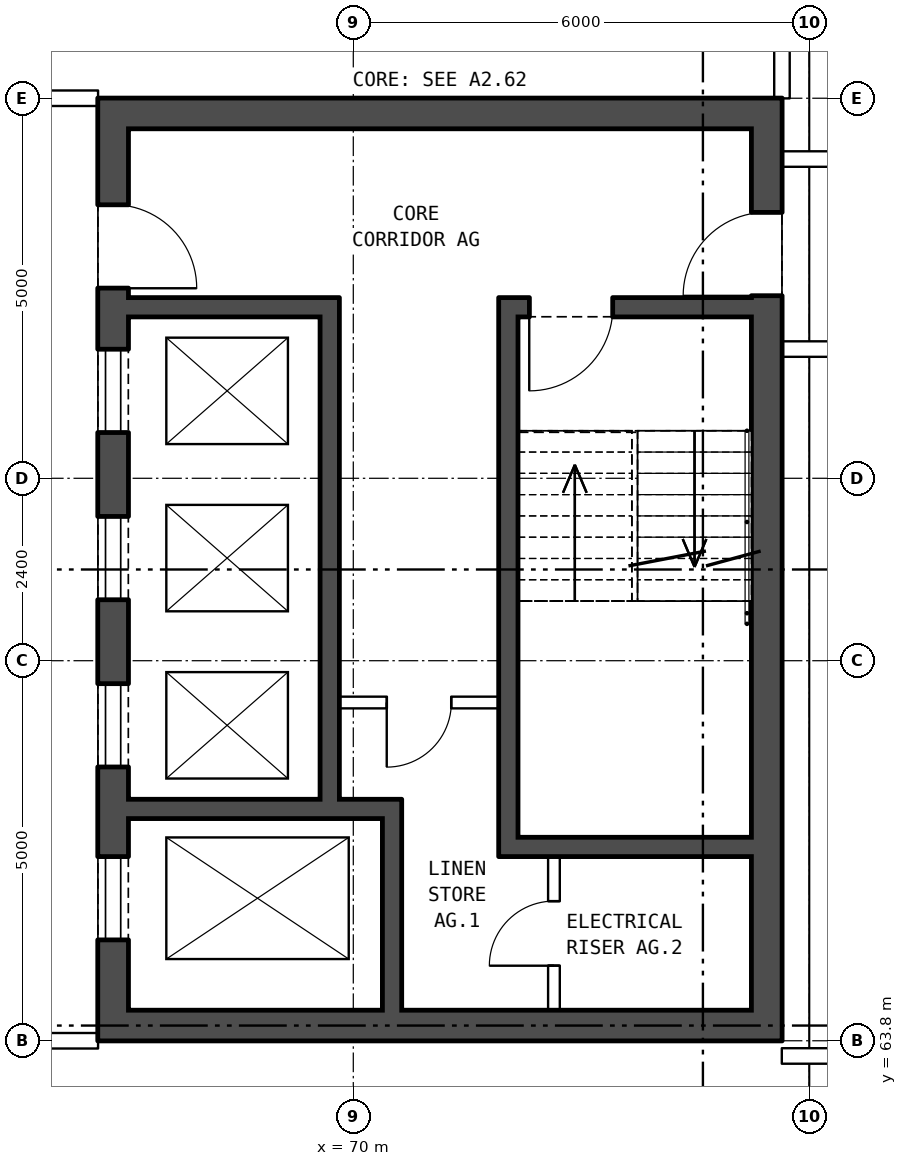
"""IFC4 building model, lengths in metres.
Left out: names, types, materials, properties, quantities, classifications, styles, units other than length and angle.
Written with IfcOpenShell. Run it as: python <this file> out.ifc"""

import sys

from ifc_helpers import new_model, si_unit, direction, frame, frame_2d, origin, place, context, subcontext, project, spatial, rectangle, extrude, element, fill, save


model = new_model("IFC4")
c1 = context("Model", 3, precision=1e-05, world=origin(), true_north=direction((0.0, 1.0)))
c2 = subcontext(c1, "Body", "Model", "MODEL_VIEW")
j1 = project(units=[si_unit("LENGTHUNIT", "METRE"), si_unit("PLANEANGLEUNIT", "RADIAN")], contexts=[c1])
p1 = place(None, origin())
s1 = spatial("IfcSite", under=j1, at=p1, CompositionType="ELEMENT")
p2 = place(p1, origin())
s2 = spatial("IfcBuilding", under=s1, at=p2, CompositionType="ELEMENT")
p3 = place(p2, frame((0.0, 0.0, 215.2)))
s3 = spatial("IfcBuildingStorey", under=s2, at=p3, CompositionType="ELEMENT", Elevation=215.2)
p4 = place(p3, frame((66.84, 63.8, 0.0), z_axis=(0.0, 0.0, 1.0), x_axis=(0.0, 1.0, 0.0)))
e1 = element("IfcWall", 1, at=p4, inside=s3, PredefinedType="SHEAR", context=c2, shape_type="SweptSolid", body=[
    extrude(rectangle(XDim=12.4, YDim=0.4, at=frame_2d((6.2, 0.0))), origin(), (0.0, 0.0, 1.0), 5.6),
])
p5 = place(p4, frame((1.325, 0.0, 0.0)))
e2 = element("IfcOpeningElement", 2, at=p5, cuts=e1, PredefinedType="OPENING", context=c2, shape_type="SweptSolid", body=[
    extrude(rectangle(XDim=1.1, YDim=2.1, at=frame_2d((0.55, 1.05))), frame((0.0, 0.21, 0.0), z_axis=(0.0, -1.0, 0.0), x_axis=(1.0, 0.0, 0.0)), (0.0, 0.0, 1.0), 0.42),
])
p6 = place(p4, frame((3.6, 0.0, 0.0)))
e3 = element("IfcOpeningElement", 3, at=p6, cuts=e1, PredefinedType="OPENING", context=c2, shape_type="SweptSolid", body=[
    extrude(rectangle(XDim=1.1, YDim=2.1, at=frame_2d((0.55, 1.05))), frame((0.0, 0.21, 0.0), z_axis=(0.0, -1.0, 0.0), x_axis=(1.0, 0.0, 0.0)), (0.0, 0.0, 1.0), 0.42),
])
p7 = place(p4, frame((5.8, 0.0, 0.0)))
e4 = element("IfcOpeningElement", 4, at=p7, cuts=e1, PredefinedType="OPENING", context=c2, shape_type="SweptSolid", body=[
    extrude(rectangle(XDim=1.1, YDim=2.1, at=frame_2d((0.55, 1.05))), frame((0.0, 0.21, 0.0), z_axis=(0.0, -1.0, 0.0), x_axis=(1.0, 0.0, 0.0)), (0.0, 0.0, 1.0), 0.42),
])
p8 = place(p4, frame((8.0, 0.0, 0.0)))
e5 = element("IfcOpeningElement", 5, at=p8, cuts=e1, PredefinedType="OPENING", context=c2, shape_type="SweptSolid", body=[
    extrude(rectangle(XDim=1.1, YDim=2.1, at=frame_2d((0.55, 1.05))), frame((0.0, 0.21, 0.0), z_axis=(0.0, -1.0, 0.0), x_axis=(1.0, 0.0, 0.0)), (0.0, 0.0, 1.0), 0.42),
])
p9 = place(p4, frame((9.9, 0.0, 0.0)))
e6 = element("IfcOpeningElement", 6, at=p9, cuts=e1, PredefinedType="OPENING", context=c2, shape_type="SweptSolid", body=[
    extrude(rectangle(XDim=1.1, YDim=2.1, at=frame_2d((0.55, 1.05))), frame((0.0, 0.21, 0.0), z_axis=(0.0, -1.0, 0.0), x_axis=(1.0, 0.0, 0.0)), (0.0, 0.0, 1.0), 0.42),
])
p10 = place(p3, frame((75.44, 63.8, 0.0), z_axis=(0.0, 0.0, 1.0), x_axis=(0.0, 1.0, 0.0)))
e7 = element("IfcWall", 7, at=p10, inside=s3, PredefinedType="SHEAR", context=c2, shape_type="SweptSolid", body=[
    extrude(rectangle(XDim=12.4, YDim=0.4, at=frame_2d((6.2, 0.0))), origin(), (0.0, 0.0, 1.0), 5.6),
])
p11 = place(p10, frame((9.8, 0.0, 0.0)))
e8 = element("IfcOpeningElement", 8, at=p11, cuts=e7, PredefinedType="OPENING", context=c2, shape_type="SweptSolid", body=[
    extrude(rectangle(XDim=1.1, YDim=2.1, at=frame_2d((0.55, 1.05))), frame((0.0, 0.21, 0.0), z_axis=(0.0, -1.0, 0.0), x_axis=(1.0, 0.0, 0.0)), (0.0, 0.0, 1.0), 0.42),
])
for number, where, z_axis, x_axis in (
    (9, (67.04, 64.0, 0.0), (0.0, 0.0, 1.0), (1.0, 0.0, 0.0)),
    (10, (67.04, 76.0, 0.0), (0.0, 0.0, 1.0), (1.0, 0.0, 0.0)),
):
    element("IfcWall", number, at=place(p3, frame(where, z_axis=z_axis, x_axis=x_axis)), inside=s3, PredefinedType="SHEAR", context=c2, shape_type="SweptSolid", body=[
        extrude(rectangle(XDim=8.2, YDim=0.4, at=frame_2d((4.1, 0.0))), origin(), (0.0, 0.0, 1.0), 5.6),
    ])
p12 = place(p3, frame((72.165, 66.35, 0.0), z_axis=(0.0, 0.0, 1.0), x_axis=(1.0, 0.0, 0.0)))
e11 = element("IfcWall", 11, at=p12, inside=s3, PredefinedType="SHEAR", context=c2, shape_type="SweptSolid", body=[
    extrude(rectangle(XDim=3.075, YDim=0.25, at=frame_2d((1.538, 0.0))), origin(), (0.0, 0.0, 1.0), 5.6),
])
p13 = place(p3, frame((67.04, 66.85, 0.0), z_axis=(0.0, 0.0, 1.0), x_axis=(1.0, 0.0, 0.0)))
e12 = element("IfcWall", 12, at=p13, inside=s3, PredefinedType="SHEAR", context=c2, shape_type="SweptSolid", body=[
    extrude(rectangle(XDim=3.595, YDim=0.25, at=frame_2d((1.797, 0.0))), origin(), (0.0, 0.0, 1.0), 5.6),
])
p14 = place(p3, frame((69.815, 68.25, 0.0), z_axis=(0.0, 0.0, 1.0), x_axis=(1.0, 0.0, 0.0)))
e13 = element("IfcWall", 13, at=p14, inside=s3, PredefinedType="PARTITIONING", context=c2, shape_type="SweptSolid", body=[
    extrude(rectangle(XDim=2.1, YDim=0.15, at=frame_2d((1.05, 0.0))), origin(), (0.0, 0.0, 1.0), 5.6),
])
p15 = place(p14, frame((0.625, 0.0, 0.0)))
e14 = element("IfcOpeningElement", 14, at=p15, cuts=e13, PredefinedType="OPENING", context=c2, shape_type="SweptSolid", body=[
    extrude(rectangle(XDim=0.85, YDim=2.1, at=frame_2d((0.425, 1.05))), frame((0.0, 0.085, 0.0), z_axis=(0.0, -1.0, 0.0), x_axis=(1.0, 0.0, 0.0)), (0.0, 0.0, 1.0), 0.17),
])
p16 = place(p3, frame((67.04, 73.45, 0.0), z_axis=(0.0, 0.0, 1.0), x_axis=(1.0, 0.0, 0.0)))
e15 = element("IfcWall", 15, at=p16, inside=s3, PredefinedType="SHEAR", context=c2, shape_type="SweptSolid", body=[
    extrude(rectangle(XDim=2.525, YDim=0.25, at=frame_2d((1.262, 0.0))), origin(), (0.0, 0.0, 1.0), 5.6),
])
p17 = place(p3, frame((72.165, 73.45, 0.0), z_axis=(0.0, 0.0, 1.0), x_axis=(1.0, 0.0, 0.0)))
e16 = element("IfcWall", 16, at=p17, inside=s3, PredefinedType="SHEAR", context=c2, shape_type="SweptSolid", body=[
    extrude(rectangle(XDim=3.075, YDim=0.25, at=frame_2d((1.538, 0.0))), origin(), (0.0, 0.0, 1.0), 5.6),
])
p18 = place(p17, frame((0.15, 0.0, 0.0)))
e17 = element("IfcOpeningElement", 17, at=p18, cuts=e16, PredefinedType="OPENING", context=c2, shape_type="SweptSolid", body=[
    extrude(rectangle(XDim=1.1, YDim=2.1, at=frame_2d((0.55, 1.05))), frame((0.0, 0.135, 0.0), z_axis=(0.0, -1.0, 0.0), x_axis=(1.0, 0.0, 0.0)), (0.0, 0.0, 1.0), 0.27),
])
p19 = place(p3, frame((69.69, 66.975, 0.0), z_axis=(0.0, 0.0, 1.0), x_axis=(0.0, 1.0, 0.0)))
e18 = element("IfcWall", 18, at=p19, inside=s3, PredefinedType="SHEAR", context=c2, shape_type="SweptSolid", body=[
    extrude(rectangle(XDim=6.6, YDim=0.25, at=frame_2d((3.3, 0.0))), origin(), (0.0, 0.0, 1.0), 5.6),
])
p20 = place(p3, frame((70.51, 64.2, 0.0), z_axis=(0.0, 0.0, 1.0), x_axis=(0.0, 1.0, 0.0)))
e19 = element("IfcWall", 19, at=p20, inside=s3, PredefinedType="SHEAR", context=c2, shape_type="SweptSolid", body=[
    extrude(rectangle(XDim=2.525, YDim=0.25, at=frame_2d((1.263, 0.0))), origin(), (0.0, 0.0, 1.0), 5.6),
])
p21 = place(p3, frame((72.04, 66.225, 0.0), z_axis=(0.0, 0.0, 1.0), x_axis=(0.0, 1.0, 0.0)))
e20 = element("IfcWall", 20, at=p21, inside=s3, PredefinedType="SHEAR", context=c2, shape_type="SweptSolid", body=[
    extrude(rectangle(XDim=7.35, YDim=0.25, at=frame_2d((3.675, 0.0))), origin(), (0.0, 0.0, 1.0), 5.6),
])
p22 = place(p3, frame((72.64, 64.2, 0.0), z_axis=(0.0, 0.0, 1.0), x_axis=(0.0, 1.0, 0.0)))
e21 = element("IfcWall", 21, at=p22, inside=s3, PredefinedType="PARTITIONING", context=c2, shape_type="SweptSolid", body=[
    extrude(rectangle(XDim=2.025, YDim=0.15, at=frame_2d((1.013, 0.0))), origin(), (0.0, 0.0, 1.0), 5.6),
])
p23 = place(p22, frame((0.587, 0.0, 0.0)))
e22 = element("IfcOpeningElement", 22, at=p23, cuts=e21, PredefinedType="OPENING", context=c2, shape_type="SweptSolid", body=[
    extrude(rectangle(XDim=0.85, YDim=2.1, at=frame_2d((0.425, 1.05))), frame((0.0, 0.085, 0.0), z_axis=(0.0, -1.0, 0.0), x_axis=(1.0, 0.0, 0.0)), (0.0, 0.0, 1.0), 0.17),
])
p24 = place(p3, frame((75.64, 63.6, 0.0), z_axis=(0.0, 0.0, 1.0), x_axis=(1.0, 0.0, 0.0)))
e23 = element("IfcWall", 23, at=p24, inside=s3, PredefinedType="PARTITIONING", context=c2, shape_type="SweptSolid", body=[
    extrude(rectangle(XDim=23.36, YDim=0.2, at=frame_2d((11.68, 0.0))), origin(), (0.0, 0.0, 1.0), 5.6),
])
p25 = place(p24, frame((5.955, 0.0, 0.0)))
e24 = element("IfcOpeningElement", 24, at=p25, cuts=e23, PredefinedType="OPENING", context=c2, shape_type="SweptSolid", body=[
    extrude(rectangle(XDim=1.0, YDim=2.1, at=frame_2d((0.5, 1.05))), frame((0.0, 0.11, 0.0), z_axis=(0.0, -1.0, 0.0), x_axis=(1.0, 0.0, 0.0)), (0.0, 0.0, 1.0), 0.22),
])
p26 = place(p3, frame((63.64, 63.8, 0.0), z_axis=(0.0, 0.0, 1.0), x_axis=(1.0, 0.0, 0.0)))
e25 = element("IfcWall", 25, at=p26, inside=s3, PredefinedType="PARTITIONING", context=c2, shape_type="SweptSolid", body=[
    extrude(rectangle(XDim=3.0, YDim=0.2, at=frame_2d((1.5, 0.0))), origin(), (0.0, 0.0, 1.0), 5.6),
])
p27 = place(p26, frame((1.0, 0.0, 0.0)))
e26 = element("IfcOpeningElement", 26, at=p27, cuts=e25, PredefinedType="OPENING", context=c2, shape_type="SweptSolid", body=[
    extrude(rectangle(XDim=1.0, YDim=2.1, at=frame_2d((0.5, 1.05))), frame((0.0, 0.11, 0.0), z_axis=(0.0, -1.0, 0.0), x_axis=(1.0, 0.0, 0.0)), (0.0, 0.0, 1.0), 0.22),
])
p28 = place(p3, frame((75.64, 72.9, 0.0), z_axis=(0.0, 0.0, 1.0), x_axis=(1.0, 0.0, 0.0)))
e27 = element("IfcWall", 27, at=p28, inside=s3, PredefinedType="PARTITIONING", context=c2, shape_type="SweptSolid", body=[
    extrude(rectangle(XDim=23.36, YDim=0.2, at=frame_2d((11.68, 0.0))), origin(), (0.0, 0.0, 1.0), 5.6),
])
p29 = place(p3, frame((75.64, 75.4, 0.0), z_axis=(0.0, 0.0, 1.0), x_axis=(1.0, 0.0, 0.0)))
e28 = element("IfcWall", 28, at=p29, inside=s3, PredefinedType="PARTITIONING", context=c2, shape_type="SweptSolid", body=[
    extrude(rectangle(XDim=55.72, YDim=0.2, at=frame_2d((27.86, 0.0))), origin(), (0.0, 0.0, 1.0), 5.6),
])
p30 = place(p29, frame((5.955, 0.0, 0.0)))
e29 = element("IfcOpeningElement", 29, at=p30, cuts=e28, PredefinedType="OPENING", context=c2, shape_type="SweptSolid", body=[
    extrude(rectangle(XDim=1.0, YDim=2.1, at=frame_2d((0.5, 1.05))), frame((0.0, 0.11, 0.0), z_axis=(0.0, -1.0, 0.0), x_axis=(1.0, 0.0, 0.0)), (0.0, 0.0, 1.0), 0.22),
])
p31 = place(p29, frame((17.048, 0.0, 0.0)))
e30 = element("IfcOpeningElement", 30, at=p31, cuts=e28, PredefinedType="OPENING", context=c2, shape_type="SweptSolid", body=[
    extrude(rectangle(XDim=1.0, YDim=2.1, at=frame_2d((0.5, 1.05))), frame((0.0, 0.11, 0.0), z_axis=(0.0, -1.0, 0.0), x_axis=(1.0, 0.0, 0.0)), (0.0, 0.0, 1.0), 0.22),
])
p32 = place(p29, frame((28.16, 0.0, 0.0)))
e31 = element("IfcOpeningElement", 31, at=p32, cuts=e28, PredefinedType="OPENING", context=c2, shape_type="SweptSolid", body=[
    extrude(rectangle(XDim=1.0, YDim=2.1, at=frame_2d((0.5, 1.05))), frame((0.0, 0.11, 0.0), z_axis=(0.0, -1.0, 0.0), x_axis=(1.0, 0.0, 0.0)), (0.0, 0.0, 1.0), 0.22),
])
p33 = place(p29, frame((37.672, 0.0, 0.0)))
e32 = element("IfcOpeningElement", 32, at=p33, cuts=e28, PredefinedType="OPENING", context=c2, shape_type="SweptSolid", body=[
    extrude(rectangle(XDim=1.0, YDim=2.1, at=frame_2d((0.5, 1.05))), frame((0.0, 0.11, 0.0), z_axis=(0.0, -1.0, 0.0), x_axis=(1.0, 0.0, 0.0)), (0.0, 0.0, 1.0), 0.22),
])
p34 = place(p29, frame((48.765, 0.0, 0.0)))
e33 = element("IfcOpeningElement", 33, at=p34, cuts=e28, PredefinedType="OPENING", context=c2, shape_type="SweptSolid", body=[
    extrude(rectangle(XDim=1.0, YDim=2.1, at=frame_2d((0.5, 1.05))), frame((0.0, 0.11, 0.0), z_axis=(0.0, -1.0, 0.0), x_axis=(1.0, 0.0, 0.0)), (0.0, 0.0, 1.0), 0.22),
])
p35 = place(p3, frame((63.64, 76.2, 0.0), z_axis=(0.0, 0.0, 1.0), x_axis=(1.0, 0.0, 0.0)))
e34 = element("IfcWall", 34, at=p35, inside=s3, PredefinedType="PARTITIONING", context=c2, shape_type="SweptSolid", body=[
    extrude(rectangle(XDim=3.0, YDim=0.2, at=frame_2d((1.5, 0.0))), origin(), (0.0, 0.0, 1.0), 5.6),
])
p36 = place(p35, frame((1.0, 0.0, 0.0)))
e35 = element("IfcOpeningElement", 35, at=p36, cuts=e34, PredefinedType="OPENING", context=c2, shape_type="SweptSolid", body=[
    extrude(rectangle(XDim=1.0, YDim=2.1, at=frame_2d((0.5, 1.05))), frame((0.0, 0.11, 0.0), z_axis=(0.0, -1.0, 0.0), x_axis=(1.0, 0.0, 0.0)), (0.0, 0.0, 1.0), 0.22),
])
p37 = place(p3, frame((75.64, 76.2, 0.0), z_axis=(0.0, 0.0, 1.0), x_axis=(0.0, 1.0, 0.0)))
e36 = element("IfcWall", 36, at=p37, inside=s3, PredefinedType="PARTITIONING", context=c2, shape_type="SweptSolid", body=[
    extrude(rectangle(XDim=3.1, YDim=0.2, at=frame_2d((1.55, 0.0))), origin(), (0.0, 0.0, 1.0), 5.6),
])
p38 = place(p5, origin())
e37 = element("IfcDoor", 37, at=p38, inside=s3, OperationType="DOUBLE_DOOR_SLIDING", PredefinedType="DOOR", context=c2, shape_type="SweptSolid", body=[
    extrude(rectangle(XDim=1.1, YDim=2.1, at=frame_2d((0.55, 1.05))), frame((0.0, -0.135, 0.0), z_axis=(0.0, -1.0, 0.0), x_axis=(1.0, 0.0, 0.0)), (0.0, 0.0, 1.0), 0.05),
])
fill(e2, e37)
p39 = place(p6, origin())
e38 = element("IfcDoor", 38, at=p39, inside=s3, OperationType="DOUBLE_DOOR_SLIDING", PredefinedType="DOOR", context=c2, shape_type="SweptSolid", body=[
    extrude(rectangle(XDim=1.1, YDim=2.1, at=frame_2d((0.55, 1.05))), frame((0.0, -0.135, 0.0), z_axis=(0.0, -1.0, 0.0), x_axis=(1.0, 0.0, 0.0)), (0.0, 0.0, 1.0), 0.05),
])
fill(e3, e38)
p40 = place(p7, origin())
e39 = element("IfcDoor", 39, at=p40, inside=s3, OperationType="DOUBLE_DOOR_SLIDING", PredefinedType="DOOR", context=c2, shape_type="SweptSolid", body=[
    extrude(rectangle(XDim=1.1, YDim=2.1, at=frame_2d((0.55, 1.05))), frame((0.0, -0.135, 0.0), z_axis=(0.0, -1.0, 0.0), x_axis=(1.0, 0.0, 0.0)), (0.0, 0.0, 1.0), 0.05),
])
fill(e4, e39)
p41 = place(p8, origin())
e40 = element("IfcDoor", 40, at=p41, inside=s3, OperationType="DOUBLE_DOOR_SLIDING", PredefinedType="DOOR", context=c2, shape_type="SweptSolid", body=[
    extrude(rectangle(XDim=1.1, YDim=2.1, at=frame_2d((0.55, 1.05))), frame((0.0, -0.135, 0.0), z_axis=(0.0, -1.0, 0.0), x_axis=(1.0, 0.0, 0.0)), (0.0, 0.0, 1.0), 0.05),
])
fill(e5, e40)
p42 = place(p9, frame((1.1, 0.0, 0.0), z_axis=(0.0, 0.0, 1.0), x_axis=(-1.0, 0.0, 0.0)))
e41 = element("IfcDoor", 41, at=p42, inside=s3, OperationType="SINGLE_SWING_RIGHT", PredefinedType="DOOR", context=c2, shape_type="SweptSolid", body=[
    extrude(rectangle(XDim=1.1, YDim=2.1, at=frame_2d((0.55, 1.05))), frame((0.0, 0.185, 0.0), z_axis=(0.0, -1.0, 0.0), x_axis=(1.0, 0.0, 0.0)), (0.0, 0.0, 1.0), 0.05),
])
fill(e6, e41)
p43 = place(p18, frame((1.1, 0.0, 0.0), z_axis=(0.0, 0.0, 1.0), x_axis=(-1.0, 0.0, 0.0)))
e42 = element("IfcDoor", 42, at=p43, inside=s3, OperationType="SINGLE_SWING_RIGHT", PredefinedType="DOOR", context=c2, shape_type="SweptSolid", body=[
    extrude(rectangle(XDim=1.1, YDim=2.1, at=frame_2d((0.55, 1.05))), frame((0.0, 0.025, 0.0), z_axis=(0.0, -1.0, 0.0), x_axis=(1.0, 0.0, 0.0)), (0.0, 0.0, 1.0), 0.05),
])
fill(e17, e42)
p44 = place(p15, frame((0.85, 0.0, 0.0), z_axis=(0.0, 0.0, 1.0), x_axis=(-1.0, 0.0, 0.0)))
e43 = element("IfcDoor", 43, at=p44, inside=s3, OperationType="SINGLE_SWING_RIGHT", PredefinedType="DOOR", context=c2, shape_type="SweptSolid", body=[
    extrude(rectangle(XDim=0.85, YDim=2.1, at=frame_2d((0.425, 1.05))), frame((0.0, 0.025, 0.0), z_axis=(0.0, -1.0, 0.0), x_axis=(1.0, 0.0, 0.0)), (0.0, 0.0, 1.0), 0.05),
])
fill(e14, e43)
p45 = place(p23, origin())
e44 = element("IfcDoor", 44, at=p45, inside=s3, OperationType="SINGLE_SWING_LEFT", PredefinedType="DOOR", context=c2, shape_type="SweptSolid", body=[
    extrude(rectangle(XDim=0.85, YDim=2.1, at=frame_2d((0.425, 1.05))), frame((0.0, 0.025, 0.0), z_axis=(0.0, -1.0, 0.0), x_axis=(1.0, 0.0, 0.0)), (0.0, 0.0, 1.0), 0.05),
])
fill(e22, e44)
p46 = place(p11, origin())
e45 = element("IfcDoor", 45, at=p46, inside=s3, OperationType="SINGLE_SWING_LEFT", PredefinedType="DOOR", context=c2, shape_type="SweptSolid", body=[
    extrude(rectangle(XDim=1.1, YDim=2.1, at=frame_2d((0.55, 1.05))), frame((0.0, 0.185, 0.0), z_axis=(0.0, -1.0, 0.0), x_axis=(1.0, 0.0, 0.0)), (0.0, 0.0, 1.0), 0.05),
])
fill(e8, e45)
save(model, sys.argv[1])
